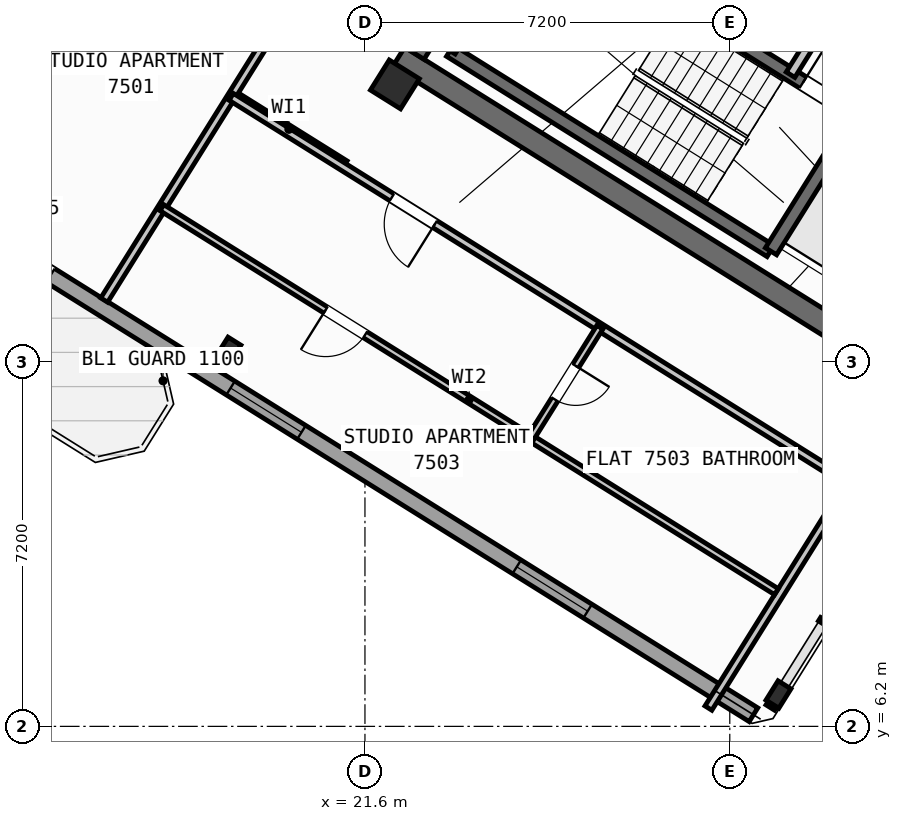
"""IFC4 building model, lengths in metres.
Left out: names, types, materials, properties, quantities, classifications, styles, units other than length and angle.
Written with IfcOpenShell. Run it as: python <this file> out.ifc"""

import sys

from ifc_helpers import new_model, si_unit, direction, frame, frame_2d, origin, origin_2d, place, context, subcontext, project, spatial, rectangle, hollow_rectangle, i_section, extrude, source, transform, mapped, element, fill, save


model = new_model("IFC4")
c1 = context("Model", 3, precision=1e-05, world=origin(), true_north=direction((0.0, 1.0)))
c2 = subcontext(c1, "Body", "Model", "MODEL_VIEW")
j1 = project(units=[si_unit("LENGTHUNIT", "METRE"), si_unit("PLANEANGLEUNIT", "RADIAN")], contexts=[c1])
p1 = place(None, origin())
s1 = spatial("IfcSite", under=j1, at=p1, CompositionType="ELEMENT")
p2 = place(p1, origin())
s2 = spatial("IfcBuilding", under=s1, at=p2, CompositionType="ELEMENT")
p3 = place(p2, frame((0.0, 0.0, 295.2)))
s3 = spatial("IfcBuildingStorey", under=s2, at=p3, CompositionType="ELEMENT", Elevation=295.2)
p4 = place(p3, frame((33.324, 12.503, 0.0), z_axis=(0.0, 0.0, 1.0), x_axis=(-0.848043529849, 0.529926571782, 0.0)))
e1 = element("IfcWall", 1, at=p4, inside=s3, PredefinedType="SHEAR", context=c2, shape_type="SweptSolid", body=[
    extrude(rectangle(XDim=13.04, YDim=0.45, at=frame_2d((6.52, 0.0))), origin(), (0.0, 0.0, 1.0), 3.32),
])
p5 = place(p3, frame((26.007, 24.976, 0.0), z_axis=(0.0, 0.0, 1.0), x_axis=(-0.529931155655, -0.848040665456, 0.0)))
e2 = element("IfcWall", 2, at=p5, inside=s3, PredefinedType="SHEAR", context=c2, shape_type="SweptSolid", body=[
    extrude(rectangle(XDim=6.475, YDim=0.45, at=frame_2d((3.238, 0.0))), origin(), (0.0, 0.0, 1.0), 3.32),
])
m1 = source(origin(), c2, "Body", "SweptSolid", [
    extrude(i_section(OverallWidth=0.3, OverallDepth=0.45, WebThickness=0.014, FlangeThickness=0.026, at=origin_2d()), origin(), (0.0, 0.0, 1.0), 3.6),
])
p6 = place(p3, frame((29.761, 6.829, 0.0), z_axis=(0.0, 0.0, 1.0), x_axis=(-0.848048096156, 0.529919264233, 0.0)))
e3 = element("IfcColumn", 3, at=p6, inside=s3, PredefinedType="COLUMN", context=c2, shape_type="MappedRepresentation", body=[
    mapped(m1, transform((0.0, 0.0, 0.0), scale=1.0)),
])
m2 = source(origin(), c2, "Body", "SweptSolid", [
    extrude(hollow_rectangle(XDim=0.7, YDim=0.7, WallThickness=0.028, at=origin_2d()), origin(), (0.0, 0.0, 1.0), 3.6),
])
p7 = place(p3, frame((22.191, 18.87, 0.0), z_axis=(0.0, 0.0, 1.0), x_axis=(-0.848048096156, 0.529919264233, 0.0)))
e4 = element("IfcColumn", 4, at=p7, inside=s3, PredefinedType="COLUMN", context=c2, shape_type="MappedRepresentation", body=[
    mapped(m2, transform((0.0, 0.0, 0.0), scale=1.0)),
])
p8 = place(p3, frame((18.906, 13.612, 0.0), z_axis=(0.0, 0.0, 1.0), x_axis=(-0.848048096156, 0.529919264233, 0.0)))
e5 = element("IfcColumn", 5, at=p8, inside=s3, PredefinedType="COLUMN", context=c2, shape_type="MappedRepresentation", body=[
    mapped(m1, transform((0.0, 0.0, 0.0), scale=1.0)),
])
p9 = place(p3, frame((29.268, 6.429, 0.0), z_axis=(0.0, 0.0, 1.0), x_axis=(-0.848048398186, 0.529918780885, 0.0)))
e6 = element("IfcWall", 6, at=p9, inside=s3, PredefinedType="STANDARD", context=c2, shape_type="SweptSolid", body=[
    extrude(rectangle(XDim=25.188, YDim=0.32, at=frame_2d((12.594, 0.0))), origin(), (0.0, 0.0, 1.0), 3.32),
])
p10 = place(p9, frame((16.362, 0.0, 0.0)))
e7 = element("IfcOpeningElement", 7, at=p10, cuts=e6, PredefinedType="OPENING", context=c2, shape_type="SweptSolid", body=[
    extrude(rectangle(XDim=1.2, YDim=2.15, at=frame_2d((0.6, 1.075))), frame((0.0, 0.17, 0.0), z_axis=(0.0, -1.0, 0.0), x_axis=(1.0, 0.0, 0.0)), (0.0, 0.0, 1.0), 0.34),
])
p11 = place(p9, frame((3.859, 0.0, 0.9)))
e8 = element("IfcOpeningElement", 8, at=p11, cuts=e6, PredefinedType="OPENING", context=c2, shape_type="SweptSolid", body=[
    extrude(rectangle(XDim=1.65, YDim=1.45, at=frame_2d((0.825, 0.725))), frame((0.0, 0.17, 0.0), z_axis=(0.0, -1.0, 0.0), x_axis=(1.0, 0.0, 0.0)), (0.0, 0.0, 1.0), 0.34),
])
p12 = place(p9, frame((10.519, 0.0, 0.9)))
e9 = element("IfcOpeningElement", 9, at=p12, cuts=e6, PredefinedType="OPENING", context=c2, shape_type="SweptSolid", body=[
    extrude(rectangle(XDim=1.65, YDim=1.45, at=frame_2d((0.825, 0.725))), frame((0.0, 0.17, 0.0), z_axis=(0.0, -1.0, 0.0), x_axis=(1.0, 0.0, 0.0)), (0.0, 0.0, 1.0), 0.34),
])
p13 = place(p9, frame((21.156, 0.0, 0.95)))
e10 = element("IfcOpeningElement", 10, at=p13, cuts=e6, PredefinedType="OPENING", context=c2, shape_type="SweptSolid", body=[
    extrude(rectangle(XDim=1.95, YDim=1.35, at=frame_2d((0.975, 0.675))), frame((0.0, 0.17, 0.0), z_axis=(0.0, -1.0, 0.0), x_axis=(1.0, 0.0, 0.0)), (0.0, 0.0, 1.0), 0.34),
])
p14 = place(p3, frame((29.605, 15.581, 0.0), z_axis=(0.0, 0.0, 1.0), x_axis=(-0.848036911448, 0.529937163087, 0.0)))
e11 = element("IfcWall", 11, at=p14, inside=s3, PredefinedType="SHEAR", context=c2, shape_type="SweptSolid", body=[
    extrude(rectangle(XDim=7.46, YDim=0.26, at=frame_2d((3.73, 0.0))), origin(), (0.0, 0.0, 1.0), 3.32),
])
p15 = place(p3, frame((31.28, 18.261, 0.0), z_axis=(0.0, 0.0, 1.0), x_axis=(-0.848051618787, 0.529913626805, 0.0)))
e12 = element("IfcWall", 12, at=p15, inside=s3, PredefinedType="SHEAR", context=c2, shape_type="SweptSolid", body=[
    extrude(rectangle(XDim=7.46, YDim=0.26, at=frame_2d((3.73, 0.0))), origin(), (0.0, 0.0, 1.0), 3.32),
])
p16 = place(p15, frame((0.36, 0.0, 0.0)))
e13 = element("IfcOpeningElement", 13, at=p16, cuts=e12, PredefinedType="OPENING", context=c2, shape_type="SweptSolid", body=[
    extrude(rectangle(XDim=0.86, YDim=2.05, at=frame_2d((0.43, 1.025))), frame((0.0, 0.14, 0.0), z_axis=(0.0, -1.0, 0.0), x_axis=(1.0, 0.0, 0.0)), (0.0, 0.0, 1.0), 0.28),
])
p17 = place(p3, frame((31.288, 18.256, 0.0), z_axis=(0.0, 0.0, 1.0), x_axis=(-0.529943379326, -0.848033026897, 0.0)))
e14 = element("IfcWall", 14, at=p17, inside=s3, PredefinedType="SHEAR", context=c2, shape_type="SweptSolid", body=[
    extrude(rectangle(XDim=3.16, YDim=0.26, at=frame_2d((1.58, 0.0))), origin(), (0.0, 0.0, 1.0), 3.32),
])
p18 = place(p3, frame((24.945, 22.22, 0.0), z_axis=(0.0, 0.0, 1.0), x_axis=(-0.529908658664, -0.84805472316, 0.0)))
e15 = element("IfcWall", 15, at=p18, inside=s3, PredefinedType="SHEAR", context=c2, shape_type="SweptSolid", body=[
    extrude(rectangle(XDim=3.16, YDim=0.26, at=frame_2d((1.58, 0.0))), origin(), (0.0, 0.0, 1.0), 3.32),
])
p19 = place(p3, frame((31.525, 21.504, 0.0), z_axis=(0.0, 0.0, 1.0), x_axis=(-0.529907497854, -0.848055448493, 0.0)))
e16 = element("IfcWall", 16, at=p19, inside=s3, PredefinedType="STANDARD", context=c2, shape_type="SweptSolid", body=[
    extrude(rectangle(XDim=2.88, YDim=0.2, at=frame_2d((1.44, 0.0))), origin(), (0.0, 0.0, 1.0), 3.31),
])
p20 = place(p3, frame((21.206, 17.292, 0.0), z_axis=(0.0, 0.0, 1.0), x_axis=(-0.848050851465, 0.529914854792, 0.0)))
e17 = element("IfcWall", 17, at=p20, inside=s3, PredefinedType="PARTITIONING", context=c2, shape_type="SweptSolid", body=[
    extrude(rectangle(XDim=2.61, YDim=0.16, at=frame_2d((1.305, 0.0))), origin(), (0.0, 0.0, 1.0), 3.31),
])
p21 = place(p3, frame((21.938, 23.391, 0.0), z_axis=(0.0, 0.0, 1.0), x_axis=(-0.529924725692, -0.848044683434, 0.0)))
e18 = element("IfcWall", 18, at=p21, inside=s3, PredefinedType="PARTITIONING", context=c2, shape_type="SweptSolid", body=[
    extrude(rectangle(XDim=10.35, YDim=0.16, at=frame_2d((5.175, 0.0))), origin(), (0.0, 0.0, 1.0), 3.31),
])
p22 = place(p3, frame((16.572, 21.954, 0.0), z_axis=(0.0, 0.0, 1.0), x_axis=(-0.529904903214, -0.848057069748, 0.0)))
e19 = element("IfcWall", 19, at=p22, inside=s3, PredefinedType="PARTITIONING", context=c2, shape_type="SweptSolid", body=[
    extrude(rectangle(XDim=5.601, YDim=0.16, at=frame_2d((2.801, 0.0))), origin(), (0.0, 0.0, 1.0), 3.31),
])
p23 = place(p3, frame((32.164, 10.374, 0.0), z_axis=(0.0, 0.0, 1.0), x_axis=(-0.848044107957, 0.529925646633, 0.0)))
e20 = element("IfcWall", 20, at=p23, inside=s3, PredefinedType="PARTITIONING", context=c2, shape_type="SweptSolid", body=[
    extrude(rectangle(XDim=15.57, YDim=0.16, at=frame_2d((7.785, 0.0))), origin(), (0.0, 0.0, 1.0), 3.31),
])
p24 = place(p23, frame((10.83, 0.0, 0.0)))
e21 = element("IfcOpeningElement", 21, at=p24, cuts=e20, PredefinedType="OPENING", context=c2, shape_type="SweptSolid", body=[
    extrude(rectangle(XDim=1.0, YDim=2.1, at=frame_2d((0.5, 1.05))), frame((0.0, 0.09, 0.0), z_axis=(0.0, -1.0, 0.0), x_axis=(1.0, 0.0, 0.0)), (0.0, 0.0, 1.0), 0.18),
])
p25 = place(p3, frame((31.282, 11.208, 0.0), z_axis=(0.0, 0.0, 1.0), x_axis=(-0.529938869374, -0.84803584519, 0.0)))
e22 = element("IfcWall", 22, at=p25, inside=s3, PredefinedType="PARTITIONING", context=c2, shape_type="SweptSolid", body=[
    extrude(rectangle(XDim=5.48, YDim=0.16, at=frame_2d((2.74, 0.0))), origin(), (0.0, 0.0, 1.0), 3.31),
])
p26 = place(p3, frame((29.72, 8.859, 0.0), z_axis=(0.0, 0.0, 1.0), x_axis=(-0.848049134363, 0.529917602752, 0.0)))
e23 = element("IfcWall", 23, at=p26, inside=s3, PredefinedType="PLUMBINGWALL", context=c2, shape_type="SweptSolid", body=[
    extrude(rectangle(XDim=14.3, YDim=0.14, at=frame_2d((7.15, 0.0))), origin(), (0.0, 0.0, 1.0), 3.31),
])
p27 = place(p26, frame((9.57, 0.0, 0.0)))
e24 = element("IfcOpeningElement", 24, at=p27, cuts=e23, PredefinedType="OPENING", context=c2, shape_type="SweptSolid", body=[
    extrude(rectangle(XDim=0.92, YDim=2.08, at=frame_2d((0.46, 1.04))), frame((0.0, 0.08, 0.0), z_axis=(0.0, -1.0, 0.0), x_axis=(1.0, 0.0, 0.0)), (0.0, 0.0, 1.0), 0.16),
])
p28 = place(p3, frame((26.237, 14.078, 0.0), z_axis=(0.0, 0.0, 1.0), x_axis=(-0.52995640672, -0.848024885824, 0.0)))
e25 = element("IfcWall", 25, at=p28, inside=s3, PredefinedType="PLUMBINGWALL", context=c2, shape_type="SweptSolid", body=[
    extrude(rectangle(XDim=2.58, YDim=0.14, at=frame_2d((1.29, 0.0))), origin(), (0.0, 0.0, 1.0), 3.31),
])
p29 = place(p28, frame((0.9, 0.0, 0.0)))
e26 = element("IfcOpeningElement", 26, at=p29, cuts=e25, PredefinedType="OPENING", context=c2, shape_type="SweptSolid", body=[
    extrude(rectangle(XDim=0.78, YDim=2.05, at=frame_2d((0.39, 1.025))), frame((0.0, 0.08, 0.0), z_axis=(0.0, -1.0, 0.0), x_axis=(1.0, 0.0, 0.0)), (0.0, 0.0, 1.0), 0.16),
])
m3 = source(origin(), c2, "Body", "SweptSolid", [
    extrude(rectangle(XDim=1.65, YDim=1.45, at=frame_2d((0.825, 0.725))), frame((0.0, 0.03, 0.0), z_axis=(0.0, -1.0, 0.0), x_axis=(1.0, 0.0, 0.0)), (0.0, 0.0, 1.0), 0.06),
])
p30 = place(p11, origin())
e27 = element("IfcWindow", 27, at=p30, inside=s3, PartitioningType="SINGLE_PANEL", PredefinedType="WINDOW", context=c2, shape_type="MappedRepresentation", body=[
    mapped(m3, transform((0.0, 0.0, 0.0), scale=1.0)),
])
fill(e8, e27)
p31 = place(p12, origin())
e28 = element("IfcWindow", 28, at=p31, inside=s3, PartitioningType="SINGLE_PANEL", PredefinedType="WINDOW", context=c2, shape_type="MappedRepresentation", body=[
    mapped(m3, transform((0.0, 0.0, 0.0), scale=1.0)),
])
fill(e9, e28)
m4 = source(origin(), c2, "Body", "SweptSolid", [
    extrude(rectangle(XDim=0.86, YDim=2.05, at=frame_2d((0.43, 1.025))), frame((0.0, 0.025, 0.0), z_axis=(0.0, -1.0, 0.0), x_axis=(1.0, 0.0, 0.0)), (0.0, 0.0, 1.0), 0.05),
])
p32 = place(p16, frame((0.86, 0.0, 0.0), z_axis=(0.0, 0.0, 1.0), x_axis=(-1.0, 0.0, 0.0)))
e29 = element("IfcDoor", 29, at=p32, inside=s3, OperationType="SINGLE_SWING_LEFT", PredefinedType="DOOR", context=c2, shape_type="MappedRepresentation", body=[
    mapped(m4, transform((0.0, 0.0, 0.0), scale=1.0)),
])
fill(e13, e29)
m5 = source(origin(), c2, "Body", "SweptSolid", [
    extrude(rectangle(XDim=1.0, YDim=2.1, at=frame_2d((0.5, 1.05))), frame((0.0, 0.025, 0.0), z_axis=(0.0, -1.0, 0.0), x_axis=(1.0, 0.0, 0.0)), (0.0, 0.0, 1.0), 0.05),
])
p33 = place(p24, origin())
e30 = element("IfcDoor", 30, at=p33, inside=s3, OperationType="SINGLE_SWING_LEFT", PredefinedType="DOOR", context=c2, shape_type="MappedRepresentation", body=[
    mapped(m5, transform((0.0, 0.0, 0.0), scale=1.0)),
])
fill(e21, e30)
m6 = source(origin(), c2, "Body", "SweptSolid", [
    extrude(rectangle(XDim=0.92, YDim=2.08, at=frame_2d((0.46, 1.04))), frame((0.0, 0.025, 0.0), z_axis=(0.0, -1.0, 0.0), x_axis=(1.0, 0.0, 0.0)), (0.0, 0.0, 1.0), 0.05),
])
p34 = place(p27, origin())
e31 = element("IfcDoor", 31, at=p34, inside=s3, OperationType="SINGLE_SWING_RIGHT", PredefinedType="DOOR", context=c2, shape_type="MappedRepresentation", body=[
    mapped(m6, transform((0.0, 0.0, 0.0), scale=1.0)),
])
fill(e24, e31)
m7 = source(origin(), c2, "Body", "SweptSolid", [
    extrude(rectangle(XDim=0.78, YDim=2.05, at=frame_2d((0.39, 1.025))), frame((0.0, 0.025, 0.0), z_axis=(0.0, -1.0, 0.0), x_axis=(1.0, 0.0, 0.0)), (0.0, 0.0, 1.0), 0.05),
])
p35 = place(p29, origin())
e32 = element("IfcDoor", 32, at=p35, inside=s3, OperationType="SINGLE_SWING_LEFT", PredefinedType="DOOR", context=c2, shape_type="MappedRepresentation", body=[
    mapped(m7, transform((0.0, 0.0, 0.0), scale=1.0)),
])
fill(e26, e32)
save(model, sys.argv[1])
